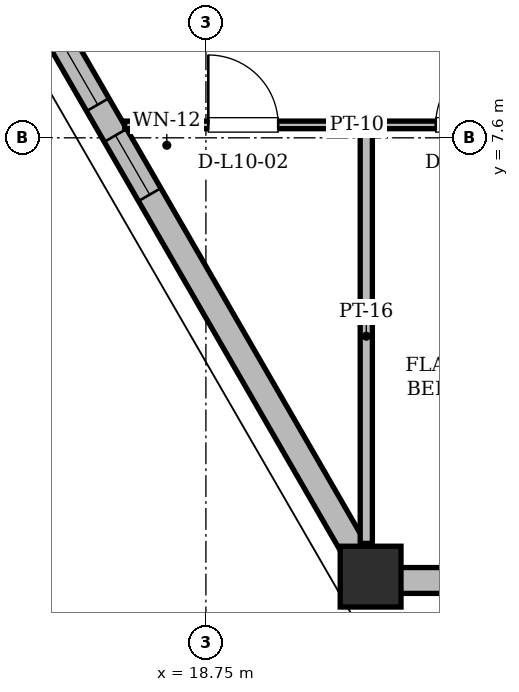
"""IFC4 building model, lengths in metres.
Left out: names, types, materials, properties, quantities, classifications, styles, units other than length and angle.
Written with IfcOpenShell. Run it as: python <this file> out.ifc"""

import sys

from ifc_helpers import new_model, si_unit, direction, frame, frame_2d, origin, origin_2d, place, context, subcontext, project, spatial, rectangle, hollow_rectangle, extrude, element, fill, save


model = new_model("IFC4")
c1 = context("Model", 3, precision=1e-05, world=origin(), true_north=direction((0.0, 1.0)))
c2 = subcontext(c1, "Body", "Model", "MODEL_VIEW")
j1 = project(units=[si_unit("LENGTHUNIT", "METRE"), si_unit("PLANEANGLEUNIT", "RADIAN")], contexts=[c1])
p1 = place(None, origin())
s1 = spatial("IfcSite", under=j1, at=p1, CompositionType="ELEMENT")
p2 = place(p1, origin())
s2 = spatial("IfcBuilding", under=s1, at=p2, CompositionType="ELEMENT")
p3 = place(p2, frame((0.0, 0.0, 41.7)))
s3 = spatial("IfcBuildingStorey", under=s2, at=p3, CompositionType="ELEMENT", Elevation=41.7)
p4 = place(p3, frame((20.941, 1.776, 0.005), z_axis=(-0.013319597819, 0.028202209668, 0.999513493498), x_axis=(-0.904225275957, -0.427055792982, 0.0)))
e1 = element("IfcColumn", 1, at=p4, inside=s3, PredefinedType="COLUMN", context=c2, shape_type="SweptSolid", body=[
    extrude(hollow_rectangle(XDim=0.8, YDim=0.8, WallThickness=0.065, at=origin_2d()), origin(), (0.0, 0.0, 1.0), 3.593),
])
p5 = place(p3, frame((13.352, 14.921, 0.0), z_axis=(0.0, 0.0, 1.0), x_axis=(0.499998602503, -0.866026210628, 0.0)))
e2 = element("IfcWall", 2, at=p5, inside=s3, PredefinedType="SOLIDWALL", context=c2, shape_type="SweptSolid", body=[
    extrude(rectangle(XDim=15.178, YDim=0.34, at=frame_2d((7.589, 0.0))), origin(), (0.0, 0.0, 1.0), 2.494),
])
p6 = place(p5, frame((6.75, 0.0, 0.85)))
e3 = element("IfcOpeningElement", 3, at=p6, cuts=e2, PredefinedType="OPENING", context=c2, shape_type="SweptSolid", body=[
    extrude(rectangle(XDim=1.2, YDim=1.48, at=frame_2d((0.6, 0.74))), frame((0.0, 0.17, 0.0), z_axis=(0.0, -1.0, 0.0), x_axis=(1.0, 0.0, 0.0)), (0.0, 0.0, 1.0), 0.34),
])
p7 = place(p5, frame((8.417, 0.0, 0.85)))
e4 = element("IfcOpeningElement", 4, at=p7, cuts=e2, PredefinedType="OPENING", context=c2, shape_type="SweptSolid", body=[
    extrude(rectangle(XDim=0.9, YDim=1.15, at=frame_2d((0.45, 0.575))), frame((0.0, 0.17, 0.0), z_axis=(0.0, -1.0, 0.0), x_axis=(1.0, 0.0, 0.0)), (0.0, 0.0, 1.0), 0.34),
])
p8 = place(p3, frame((20.941, 1.776, 0.0), z_axis=(0.0, 0.0, 1.0), x_axis=(1.0, 0.0, 0.0)))
e5 = element("IfcWall", 5, at=p8, inside=s3, PredefinedType="SOLIDWALL", context=c2, shape_type="SweptSolid", body=[
    extrude(rectangle(XDim=33.119, YDim=0.34, at=frame_2d((16.559, 0.0))), origin(), (0.0, 0.0, 1.0), 2.494),
])
p9 = place(p8, frame((6.369, 0.0, 0.0)))
e6 = element("IfcOpeningElement", 6, at=p9, cuts=e5, PredefinedType="OPENING", context=c2, shape_type="SweptSolid", body=[
    extrude(rectangle(XDim=1.5, YDim=2.2, at=frame_2d((0.75, 1.1))), frame((0.0, 0.17, 0.0), z_axis=(0.0, -1.0, 0.0), x_axis=(1.0, 0.0, 0.0)), (0.0, 0.0, 1.0), 0.34),
])
p10 = place(p8, frame((24.004, 0.0, 0.0)))
e7 = element("IfcOpeningElement", 7, at=p10, cuts=e5, PredefinedType="OPENING", context=c2, shape_type="SweptSolid", body=[
    extrude(rectangle(XDim=1.5, YDim=2.2, at=frame_2d((0.75, 1.1))), frame((0.0, 0.17, 0.0), z_axis=(0.0, -1.0, 0.0), x_axis=(1.0, 0.0, 0.0)), (0.0, 0.0, 1.0), 0.34),
])
p11 = place(p8, frame((12.548, 0.0, 0.85)))
e8 = element("IfcOpeningElement", 8, at=p11, cuts=e5, PredefinedType="OPENING", context=c2, shape_type="SweptSolid", body=[
    extrude(rectangle(XDim=1.6, YDim=1.534, at=frame_2d((0.8, 0.767))), frame((0.0, 0.17, 0.0), z_axis=(0.0, -1.0, 0.0), x_axis=(1.0, 0.0, 0.0)), (0.0, 0.0, 1.0), 0.34),
])
p12 = place(p8, frame((15.114, 0.0, 0.85)))
e9 = element("IfcOpeningElement", 9, at=p12, cuts=e5, PredefinedType="OPENING", context=c2, shape_type="SweptSolid", body=[
    extrude(rectangle(XDim=2.0, YDim=1.534, at=frame_2d((1.0, 0.767))), frame((0.0, 0.17, 0.0), z_axis=(0.0, -1.0, 0.0), x_axis=(1.0, 0.0, 0.0)), (0.0, 0.0, 1.0), 0.34),
])
p13 = place(p8, frame((20.523, 0.0, 0.85)))
e10 = element("IfcOpeningElement", 10, at=p13, cuts=e5, PredefinedType="OPENING", context=c2, shape_type="SweptSolid", body=[
    extrude(rectangle(XDim=1.4, YDim=1.534, at=frame_2d((0.7, 0.767))), frame((0.0, 0.17, 0.0), z_axis=(0.0, -1.0, 0.0), x_axis=(1.0, 0.0, 0.0)), (0.0, 0.0, 1.0), 0.34),
])
p14 = place(p8, frame((1.043, 0.0, 0.85)))
e11 = element("IfcOpeningElement", 11, at=p14, cuts=e5, PredefinedType="OPENING", context=c2, shape_type="SweptSolid", body=[
    extrude(rectangle(XDim=1.2, YDim=1.48, at=frame_2d((0.6, 0.74))), frame((0.0, 0.17, 0.0), z_axis=(0.0, -1.0, 0.0), x_axis=(1.0, 0.0, 0.0)), (0.0, 0.0, 1.0), 0.34),
])
p15 = place(p8, frame((3.094, 0.0, 0.85)))
e12 = element("IfcOpeningElement", 12, at=p15, cuts=e5, PredefinedType="OPENING", context=c2, shape_type="SweptSolid", body=[
    extrude(rectangle(XDim=1.2, YDim=1.48, at=frame_2d((0.6, 0.74))), frame((0.0, 0.17, 0.0), z_axis=(0.0, -1.0, 0.0), x_axis=(1.0, 0.0, 0.0)), (0.0, 0.0, 1.0), 0.34),
])
p16 = place(p8, frame((30.091, 0.0, 0.85)))
e13 = element("IfcOpeningElement", 13, at=p16, cuts=e5, PredefinedType="OPENING", context=c2, shape_type="SweptSolid", body=[
    extrude(rectangle(XDim=1.6, YDim=1.534, at=frame_2d((0.8, 0.767))), frame((0.0, 0.17, 0.0), z_axis=(0.0, -1.0, 0.0), x_axis=(1.0, 0.0, 0.0)), (0.0, 0.0, 1.0), 0.34),
])
p17 = place(p3, frame((17.681, 7.77, 0.0), z_axis=(0.0, 0.0, 1.0), x_axis=(1.0, 0.0, 0.0)))
e14 = element("IfcWall", 14, at=p17, inside=s3, PredefinedType="PARTITIONING", context=c2, shape_type="SweptSolid", body=[
    extrude(rectangle(XDim=9.919, YDim=0.1, at=frame_2d((4.959, 0.0))), origin(), (0.0, 0.0, 1.0), 2.738),
])
p18 = place(p17, frame((1.1, 0.0, 0.0)))
e15 = element("IfcOpeningElement", 15, at=p18, cuts=e14, PredefinedType="OPENING", context=c2, shape_type="SweptSolid", body=[
    extrude(rectangle(XDim=0.92, YDim=2.12, at=frame_2d((0.46, 1.06))), frame((0.0, 0.05, 0.0), z_axis=(0.0, -1.0, 0.0), x_axis=(1.0, 0.0, 0.0)), (0.0, 0.0, 1.0), 0.1),
])
p19 = place(p17, frame((4.092, 0.0, 0.0)))
e16 = element("IfcOpeningElement", 16, at=p19, cuts=e14, PredefinedType="OPENING", context=c2, shape_type="SweptSolid", body=[
    extrude(rectangle(XDim=0.92, YDim=2.12, at=frame_2d((0.46, 1.06))), frame((0.0, 0.05, 0.0), z_axis=(0.0, -1.0, 0.0), x_axis=(1.0, 0.0, 0.0)), (0.0, 0.0, 1.0), 0.1),
])
p20 = place(p17, frame((6.479, 0.0, 0.0)))
e17 = element("IfcOpeningElement", 17, at=p20, cuts=e14, PredefinedType="OPENING", context=c2, shape_type="SweptSolid", body=[
    extrude(rectangle(XDim=0.95, YDim=2.1, at=frame_2d((0.475, 1.05))), frame((0.0, 0.05, 0.0), z_axis=(0.0, -1.0, 0.0), x_axis=(1.0, 0.0, 0.0)), (0.0, 0.0, 1.0), 0.1),
])
p21 = place(p17, frame((8.499, 0.0, 0.0)))
e18 = element("IfcOpeningElement", 18, at=p21, cuts=e14, PredefinedType="OPENING", context=c2, shape_type="SweptSolid", body=[
    extrude(rectangle(XDim=0.88, YDim=2.08, at=frame_2d((0.44, 1.04))), frame((0.0, 0.05, 0.0), z_axis=(0.0, -1.0, 0.0), x_axis=(1.0, 0.0, 0.0)), (0.0, 0.0, 1.0), 0.1),
])
p22 = place(p3, frame((20.86, 2.264, 0.0), z_axis=(0.0, 0.0, 1.0), x_axis=(0.0, 1.0, 0.0)))
e19 = element("IfcWall", 19, at=p22, inside=s3, PredefinedType="PARTITIONING", context=c2, shape_type="SweptSolid", body=[
    extrude(rectangle(XDim=5.452, YDim=0.16, at=frame_2d((2.726, 0.0))), origin(), (0.0, 0.0, 1.0), 3.36),
])
p23 = place(p6, origin())
e20 = element("IfcWindow", 20, at=p23, inside=s3, PartitioningType="SINGLE_PANEL", PredefinedType="WINDOW", context=c2, shape_type="SweptSolid", body=[
    extrude(rectangle(XDim=1.2, YDim=1.48, at=frame_2d((0.6, 0.74))), frame((0.0, 0.03, 0.0), z_axis=(0.0, -1.0, 0.0), x_axis=(1.0, 0.0, 0.0)), (0.0, 0.0, 1.0), 0.06),
])
fill(e3, e20)
p24 = place(p7, origin())
e21 = element("IfcWindow", 21, at=p24, inside=s3, PartitioningType="SINGLE_PANEL", PredefinedType="WINDOW", context=c2, shape_type="SweptSolid", body=[
    extrude(rectangle(XDim=0.9, YDim=1.15, at=frame_2d((0.45, 0.575))), frame((0.0, 0.03, 0.0), z_axis=(0.0, -1.0, 0.0), x_axis=(1.0, 0.0, 0.0)), (0.0, 0.0, 1.0), 0.06),
])
fill(e4, e21)
p25 = place(p18, origin())
e22 = element("IfcDoor", 22, at=p25, inside=s3, OperationType="SINGLE_SWING_LEFT", PredefinedType="DOOR", context=c2, shape_type="SweptSolid", body=[
    extrude(rectangle(XDim=0.92, YDim=2.12, at=frame_2d((0.46, 1.06))), frame((0.0, 0.025, 0.0), z_axis=(0.0, -1.0, 0.0), x_axis=(1.0, 0.0, 0.0)), (0.0, 0.0, 1.0), 0.05),
])
fill(e15, e22)
p26 = place(p19, origin())
e23 = element("IfcDoor", 23, at=p26, inside=s3, OperationType="SINGLE_SWING_RIGHT", PredefinedType="DOOR", context=c2, shape_type="SweptSolid", body=[
    extrude(rectangle(XDim=0.92, YDim=2.12, at=frame_2d((0.46, 1.06))), frame((0.0, 0.025, 0.0), z_axis=(0.0, -1.0, 0.0), x_axis=(1.0, 0.0, 0.0)), (0.0, 0.0, 1.0), 0.05),
])
fill(e16, e23)
save(model, sys.argv[1])
